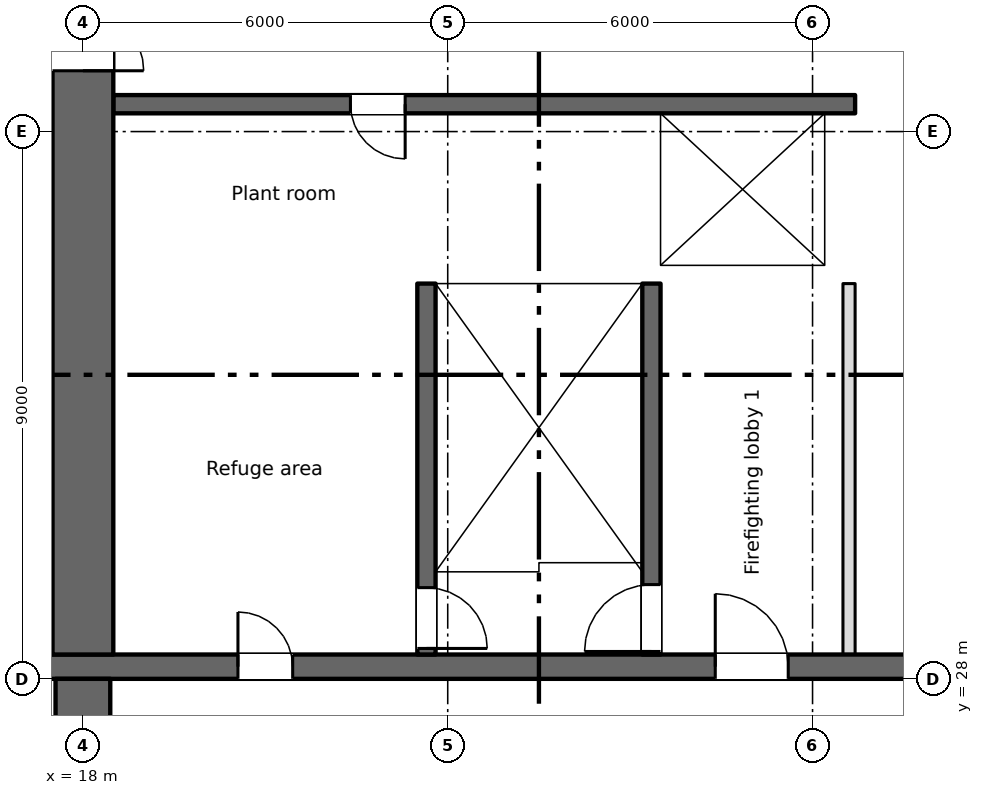
"""IFC4 building model, lengths in metres.
Left out: names, types, materials, properties, quantities, classifications, styles, units other than length and angle.
Written with IfcOpenShell. Run it as: python <this file> out.ifc"""

import sys

from ifc_helpers import new_model, si_unit, direction, frame, frame_2d, origin, place, context, subcontext, project, spatial, rectangle, extrude, element, fill, save


model = new_model("IFC4")
c1 = context("Model", 3, precision=1e-05, world=origin(), true_north=direction((0.0, 1.0)))
c2 = subcontext(c1, "Body", "Model", "MODEL_VIEW")
j1 = project(units=[si_unit("LENGTHUNIT", "METRE"), si_unit("PLANEANGLEUNIT", "RADIAN")], contexts=[c1])
p1 = place(None, origin())
s1 = spatial("IfcSite", under=j1, at=p1, CompositionType="ELEMENT")
p2 = place(p1, origin())
s2 = spatial("IfcBuilding", under=s1, at=p2, CompositionType="ELEMENT")
p3 = place(p2, frame((0.0, 0.0, 226.75)))
s3 = spatial("IfcBuildingStorey", under=s2, at=p3, CompositionType="ELEMENT", Elevation=226.75)
p4 = place(p3, frame((18.0, 4.4, 0.0), z_axis=(0.0, 0.0, 1.0), x_axis=(0.0, 1.0, 0.0)))
e1 = element("IfcWall", 1, at=p4, inside=s3, PredefinedType="SHEAR", context=c2, shape_type="SweptSolid", body=[
    extrude(rectangle(XDim=23.6, YDim=0.9, at=frame_2d((11.8, 0.0))), origin(), (0.0, 0.0, 1.0), 4.2),
])
p5 = place(p4, frame((21.5, 0.0, 0.0)))
e2 = element("IfcOpeningElement", 2, at=p5, cuts=e1, PredefinedType="OPENING", context=c2, shape_type="SweptSolid", body=[
    extrude(rectangle(XDim=1.2, YDim=2.1, at=frame_2d((0.6, 1.05))), frame((0.0, 0.46, 0.0), z_axis=(0.0, -1.0, 0.0), x_axis=(1.0, 0.0, 0.0)), (0.0, 0.0, 1.0), 0.92),
])
p6 = place(p3, frame((6.6, 28.2, 0.0), z_axis=(0.0, 0.0, 1.0), x_axis=(1.0, 0.0, 0.0)))
e3 = element("IfcWall", 3, at=p6, inside=s3, PredefinedType="SHEAR", context=c2, shape_type="SweptSolid", body=[
    extrude(rectangle(XDim=57.9, YDim=0.4, at=frame_2d((28.95, 0.0))), origin(), (0.0, 0.0, 1.0), 4.2),
])
p7 = place(p6, frame((13.95, 0.0, 0.0)))
e4 = element("IfcOpeningElement", 4, at=p7, cuts=e3, PredefinedType="OPENING", context=c2, shape_type="SweptSolid", body=[
    extrude(rectangle(XDim=0.9, YDim=2.1, at=frame_2d((0.45, 1.05))), frame((0.0, 0.21, 0.0), z_axis=(0.0, -1.0, 0.0), x_axis=(1.0, 0.0, 0.0)), (0.0, 0.0, 1.0), 0.42),
])
p8 = place(p6, frame((49.95, 0.0, 0.0)))
e5 = element("IfcOpeningElement", 5, at=p8, cuts=e3, PredefinedType="OPENING", context=c2, shape_type="SweptSolid", body=[
    extrude(rectangle(XDim=0.9, YDim=2.1, at=frame_2d((0.45, 1.05))), frame((0.0, 0.21, 0.0), z_axis=(0.0, -1.0, 0.0), x_axis=(1.0, 0.0, 0.0)), (0.0, 0.0, 1.0), 0.42),
])
p9 = place(p6, frame((1.45, 0.0, 0.0)))
e6 = element("IfcOpeningElement", 6, at=p9, cuts=e3, PredefinedType="OPENING", context=c2, shape_type="SweptSolid", body=[
    extrude(rectangle(XDim=0.9, YDim=2.1, at=frame_2d((0.45, 1.05))), frame((0.0, 0.21, 0.0), z_axis=(0.0, -1.0, 0.0), x_axis=(1.0, 0.0, 0.0)), (0.0, 0.0, 1.0), 0.42),
])
p10 = place(p6, frame((4.8, 0.0, 0.0)))
e7 = element("IfcOpeningElement", 7, at=p10, cuts=e3, PredefinedType="OPENING", context=c2, shape_type="SweptSolid", body=[
    extrude(rectangle(XDim=1.2, YDim=2.1, at=frame_2d((0.6, 1.05))), frame((0.0, 0.21, 0.0), z_axis=(0.0, -1.0, 0.0), x_axis=(1.0, 0.0, 0.0)), (0.0, 0.0, 1.0), 0.42),
])
p11 = place(p6, frame((31.8, 0.0, 0.0)))
e8 = element("IfcOpeningElement", 8, at=p11, cuts=e3, PredefinedType="OPENING", context=c2, shape_type="SweptSolid", body=[
    extrude(rectangle(XDim=1.2, YDim=2.1, at=frame_2d((0.6, 1.05))), frame((0.0, 0.21, 0.0), z_axis=(0.0, -1.0, 0.0), x_axis=(1.0, 0.0, 0.0)), (0.0, 0.0, 1.0), 0.42),
])
p12 = place(p6, frame((55.3, 0.0, 0.0)))
e9 = element("IfcOpeningElement", 9, at=p12, cuts=e3, PredefinedType="OPENING", context=c2, shape_type="SweptSolid", body=[
    extrude(rectangle(XDim=1.2, YDim=2.1, at=frame_2d((0.6, 1.05))), frame((0.0, 0.21, 0.0), z_axis=(0.0, -1.0, 0.0), x_axis=(1.0, 0.0, 0.0)), (0.0, 0.0, 1.0), 0.42),
])
p13 = place(p6, frame((21.8, 0.0, 0.0)))
e10 = element("IfcOpeningElement", 10, at=p13, cuts=e3, PredefinedType="OPENING", context=c2, shape_type="SweptSolid", body=[
    extrude(rectangle(XDim=1.2, YDim=2.1, at=frame_2d((0.6, 1.05))), frame((0.0, 0.21, 0.0), z_axis=(0.0, -1.0, 0.0), x_axis=(1.0, 0.0, 0.0)), (0.0, 0.0, 1.0), 0.42),
])
p14 = place(p6, frame((41.8, 0.0, 0.0)))
e11 = element("IfcOpeningElement", 11, at=p14, cuts=e3, PredefinedType="OPENING", context=c2, shape_type="SweptSolid", body=[
    extrude(rectangle(XDim=1.2, YDim=2.1, at=frame_2d((0.6, 1.05))), frame((0.0, 0.21, 0.0), z_axis=(0.0, -1.0, 0.0), x_axis=(1.0, 0.0, 0.0)), (0.0, 0.0, 1.0), 0.42),
])
p15 = place(p6, frame((24.95, 0.0, 0.0)))
e12 = element("IfcOpeningElement", 12, at=p15, cuts=e3, PredefinedType="OPENING", context=c2, shape_type="SweptSolid", body=[
    extrude(rectangle(XDim=2.4, YDim=2.1, at=frame_2d((1.2, 1.05))), frame((0.0, 0.21, 0.0), z_axis=(0.0, -1.0, 0.0), x_axis=(1.0, 0.0, 0.0)), (0.0, 0.0, 1.0), 0.42),
])
p16 = place(p6, frame((37.45, 0.0, 0.0)))
e13 = element("IfcOpeningElement", 13, at=p16, cuts=e3, PredefinedType="OPENING", context=c2, shape_type="SweptSolid", body=[
    extrude(rectangle(XDim=2.4, YDim=2.1, at=frame_2d((1.2, 1.05))), frame((0.0, 0.21, 0.0), z_axis=(0.0, -1.0, 0.0), x_axis=(1.0, 0.0, 0.0)), (0.0, 0.0, 1.0), 0.42),
])
p17 = place(p6, frame((7.95, 0.0, 0.0)))
e14 = element("IfcOpeningElement", 14, at=p17, cuts=e3, PredefinedType="OPENING", context=c2, shape_type="SweptSolid", body=[
    extrude(rectangle(XDim=2.4, YDim=2.1, at=frame_2d((1.2, 1.05))), frame((0.0, 0.21, 0.0), z_axis=(0.0, -1.0, 0.0), x_axis=(1.0, 0.0, 0.0)), (0.0, 0.0, 1.0), 0.42),
])
p18 = place(p6, frame((28.95, 0.0, 0.0)))
e15 = element("IfcOpeningElement", 15, at=p18, cuts=e3, PredefinedType="OPENING", context=c2, shape_type="SweptSolid", body=[
    extrude(rectangle(XDim=0.9, YDim=2.1, at=frame_2d((0.45, 1.05))), frame((0.0, 0.21, 0.0), z_axis=(0.0, -1.0, 0.0), x_axis=(1.0, 0.0, 0.0)), (0.0, 0.0, 1.0), 0.42),
])
p19 = place(p6, frame((34.95, 0.0, 0.0)))
e16 = element("IfcOpeningElement", 16, at=p19, cuts=e3, PredefinedType="OPENING", context=c2, shape_type="SweptSolid", body=[
    extrude(rectangle(XDim=0.9, YDim=2.1, at=frame_2d((0.45, 1.05))), frame((0.0, 0.21, 0.0), z_axis=(0.0, -1.0, 0.0), x_axis=(1.0, 0.0, 0.0)), (0.0, 0.0, 1.0), 0.42),
])
p20 = place(p3, frame((18.0, 28.4, 0.0), z_axis=(0.0, 0.0, 1.0), x_axis=(0.0, 1.0, 0.0)))
e17 = element("IfcWall", 17, at=p20, inside=s3, PredefinedType="SHEAR", context=c2, shape_type="SweptSolid", body=[
    extrude(rectangle(XDim=16.9, YDim=1.0, at=frame_2d((8.45, 0.0))), origin(), (0.0, 0.0, 1.0), 4.2),
])
p21 = place(p20, frame((9.6, 0.0, 0.0)))
e18 = element("IfcOpeningElement", 18, at=p21, cuts=e17, PredefinedType="OPENING", context=c2, shape_type="SweptSolid", body=[
    extrude(rectangle(XDim=2.0, YDim=2.1, at=frame_2d((1.0, 1.05))), frame((0.0, 0.51, 0.0), z_axis=(0.0, -1.0, 0.0), x_axis=(1.0, 0.0, 0.0)), (0.0, 0.0, 1.0), 1.02),
])
p22 = place(p20, frame((15.4, 0.0, 0.0)))
e19 = element("IfcOpeningElement", 19, at=p22, cuts=e17, PredefinedType="OPENING", context=c2, shape_type="SweptSolid", body=[
    extrude(rectangle(XDim=1.2, YDim=2.1, at=frame_2d((0.6, 1.05))), frame((0.0, 0.51, 0.0), z_axis=(0.0, -1.0, 0.0), x_axis=(1.0, 0.0, 0.0)), (0.0, 0.0, 1.0), 1.02),
])
p23 = place(p3, frame((23.65, 34.5, 0.0), z_axis=(0.0, 0.0, 1.0), x_axis=(0.0, -1.0, 0.0)))
e20 = element("IfcWall", 20, at=p23, inside=s3, PredefinedType="SHEAR", context=c2, shape_type="SweptSolid", body=[
    extrude(rectangle(XDim=6.1, YDim=0.3, at=frame_2d((3.05, 0.0))), origin(), (0.0, 0.0, 1.0), 4.2),
])
p24 = place(p23, frame((5.0, 0.0, 0.0)))
e21 = element("IfcOpeningElement", 21, at=p24, cuts=e20, PredefinedType="OPENING", context=c2, shape_type="SweptSolid", body=[
    extrude(rectangle(XDim=1.0, YDim=2.1, at=frame_2d((0.5, 1.05))), frame((0.0, 0.16, 0.0), z_axis=(0.0, -1.0, 0.0), x_axis=(1.0, 0.0, 0.0)), (0.0, 0.0, 1.0), 0.32),
])
p25 = place(p3, frame((27.35, 28.4, 0.0), z_axis=(0.0, 0.0, 1.0), x_axis=(0.0, 1.0, 0.0)))
e22 = element("IfcWall", 22, at=p25, inside=s3, PredefinedType="SHEAR", context=c2, shape_type="SweptSolid", body=[
    extrude(rectangle(XDim=6.1, YDim=0.3, at=frame_2d((3.05, 0.0))), origin(), (0.0, 0.0, 1.0), 4.2),
])
p26 = place(p25, frame((0.05, 0.0, 0.0)))
e23 = element("IfcOpeningElement", 23, at=p26, cuts=e22, PredefinedType="OPENING", context=c2, shape_type="SweptSolid", body=[
    extrude(rectangle(XDim=1.1, YDim=2.1, at=frame_2d((0.55, 1.05))), frame((0.0, 0.16, 0.0), z_axis=(0.0, -1.0, 0.0), x_axis=(1.0, 0.0, 0.0)), (0.0, 0.0, 1.0), 0.32),
])
p27 = place(p3, frame((18.5, 34.65, 0.0), z_axis=(0.0, 0.0, 1.0), x_axis=(1.0, 0.0, 0.0)))
e24 = element("IfcWall", 24, at=p27, inside=s3, PredefinedType="SHEAR", context=c2, shape_type="SweptSolid", body=[
    extrude(rectangle(XDim=12.2, YDim=0.3, at=frame_2d((6.1, 0.0))), origin(), (0.0, 0.0, 1.0), 4.2),
])
p28 = place(p27, frame((9.8, 0.0, 0.0)))
e25 = element("IfcOpeningElement", 25, at=p28, cuts=e24, PredefinedType="OPENING", context=c2, shape_type="SweptSolid", body=[
    extrude(rectangle(XDim=1.1, YDim=2.1, at=frame_2d((0.55, 1.05))), frame((0.0, 0.16, 0.0), z_axis=(0.0, -1.0, 0.0), x_axis=(1.0, 0.0, 0.0)), (0.0, 0.0, 1.0), 0.32),
])
p29 = place(p3, frame((30.7, 37.45, 0.0), z_axis=(0.0, 0.0, 1.0), x_axis=(-1.0, 0.0, 0.0)))
e26 = element("IfcWall", 26, at=p29, inside=s3, PredefinedType="SHEAR", context=c2, shape_type="SweptSolid", body=[
    extrude(rectangle(XDim=12.2, YDim=0.3, at=frame_2d((6.1, 0.0))), origin(), (0.0, 0.0, 1.0), 4.2),
])
p30 = place(p29, frame((7.4, 0.0, 0.0)))
e27 = element("IfcOpeningElement", 27, at=p30, cuts=e26, PredefinedType="OPENING", context=c2, shape_type="SweptSolid", body=[
    extrude(rectangle(XDim=0.9, YDim=2.1, at=frame_2d((0.45, 1.05))), frame((0.0, 0.16, 0.0), z_axis=(0.0, -1.0, 0.0), x_axis=(1.0, 0.0, 0.0)), (0.0, 0.0, 1.0), 0.32),
])
p31 = place(p3, frame((27.35, 34.8, 0.0), z_axis=(0.0, 0.0, 1.0), x_axis=(0.0, 1.0, 0.0)))
e28 = element("IfcWall", 28, at=p31, inside=s3, PredefinedType="SHEAR", context=c2, shape_type="SweptSolid", body=[
    extrude(rectangle(XDim=2.5, YDim=0.3, at=frame_2d((1.25, 0.0))), origin(), (0.0, 0.0, 1.0), 4.2),
])
p32 = place(p3, frame((30.45, 34.8, 0.0), z_axis=(0.0, 0.0, 1.0), x_axis=(0.0, 1.0, 0.0)))
e29 = element("IfcWall", 29, at=p32, inside=s3, PredefinedType="SHEAR", context=c2, shape_type="SweptSolid", body=[
    extrude(rectangle(XDim=2.5, YDim=0.5, at=frame_2d((1.25, 0.0))), origin(), (0.0, 0.0, 1.0), 4.2),
])
p33 = place(p3, frame((30.6, 28.4, 0.0), z_axis=(0.0, 0.0, 1.0), x_axis=(0.0, 1.0, 0.0)))
e30 = element("IfcWall", 30, at=p33, inside=s3, PredefinedType="PARTITIONING", context=c2, shape_type="SweptSolid", body=[
    extrude(rectangle(XDim=6.1, YDim=0.2, at=frame_2d((3.05, 0.0))), origin(), (0.0, 0.0, 1.0), 4.2),
])
p34 = place(p7, origin())
e31 = element("IfcDoor", 31, at=p34, inside=s3, OperationType="SINGLE_SWING_LEFT", PredefinedType="DOOR", context=c2, shape_type="SweptSolid", body=[
    extrude(rectangle(XDim=0.9, YDim=2.1, at=frame_2d((0.45, 1.05))), frame((0.0, 0.025, 0.0), z_axis=(0.0, -1.0, 0.0), x_axis=(1.0, 0.0, 0.0)), (0.0, 0.0, 1.0), 0.05),
])
fill(e4, e31)
p35 = place(p24, origin())
e32 = element("IfcDoor", 32, at=p35, inside=s3, OperationType="SINGLE_SWING_RIGHT", PredefinedType="DOOR", context=c2, shape_type="SweptSolid", body=[
    extrude(rectangle(XDim=1.0, YDim=2.1, at=frame_2d((0.5, 1.05))), frame((0.0, 0.025, 0.0), z_axis=(0.0, -1.0, 0.0), x_axis=(1.0, 0.0, 0.0)), (0.0, 0.0, 1.0), 0.05),
])
fill(e21, e32)
p36 = place(p30, origin())
e33 = element("IfcDoor", 33, at=p36, inside=s3, OperationType="SINGLE_SWING_LEFT", PredefinedType="DOOR", context=c2, shape_type="SweptSolid", body=[
    extrude(rectangle(XDim=0.9, YDim=2.1, at=frame_2d((0.45, 1.05))), frame((0.0, 0.025, 0.0), z_axis=(0.0, -1.0, 0.0), x_axis=(1.0, 0.0, 0.0)), (0.0, 0.0, 1.0), 0.05),
])
fill(e27, e33)
p37 = place(p28, origin())
e34 = element("IfcDoor", 34, at=p37, inside=s3, OperationType="SLIDING_TO_LEFT", PredefinedType="DOOR", context=c2, shape_type="SweptSolid", body=[
    extrude(rectangle(XDim=1.1, YDim=2.1, at=frame_2d((0.55, 1.05))), frame((0.0, 0.025, 0.0), z_axis=(0.0, -1.0, 0.0), x_axis=(1.0, 0.0, 0.0)), (0.0, 0.0, 1.0), 0.05),
])
fill(e25, e34)
p38 = place(p26, origin())
e35 = element("IfcDoor", 35, at=p38, inside=s3, OperationType="SINGLE_SWING_LEFT", PredefinedType="DOOR", context=c2, shape_type="SweptSolid", body=[
    extrude(rectangle(XDim=1.1, YDim=2.1, at=frame_2d((0.55, 1.05))), frame((0.0, 0.025, 0.0), z_axis=(0.0, -1.0, 0.0), x_axis=(1.0, 0.0, 0.0)), (0.0, 0.0, 1.0), 0.05),
])
fill(e23, e35)
p39 = place(p13, origin())
e36 = element("IfcDoor", 36, at=p39, inside=s3, OperationType="SINGLE_SWING_LEFT", PredefinedType="DOOR", context=c2, shape_type="SweptSolid", body=[
    extrude(rectangle(XDim=1.2, YDim=2.1, at=frame_2d((0.6, 1.05))), frame((0.0, 0.025, 0.0), z_axis=(0.0, -1.0, 0.0), x_axis=(1.0, 0.0, 0.0)), (0.0, 0.0, 1.0), 0.05),
])
fill(e10, e36)
p40 = place(p21, origin())
e37 = element("IfcDoor", 37, at=p40, inside=s3, OperationType="DOUBLE_DOOR_SINGLE_SWING", PredefinedType="DOOR", context=c2, shape_type="SweptSolid", body=[
    extrude(rectangle(XDim=2.0, YDim=2.1, at=frame_2d((1.0, 1.05))), frame((0.0, 0.025, 0.0), z_axis=(0.0, -1.0, 0.0), x_axis=(1.0, 0.0, 0.0)), (0.0, 0.0, 1.0), 0.05),
])
fill(e18, e37)
save(model, sys.argv[1])
